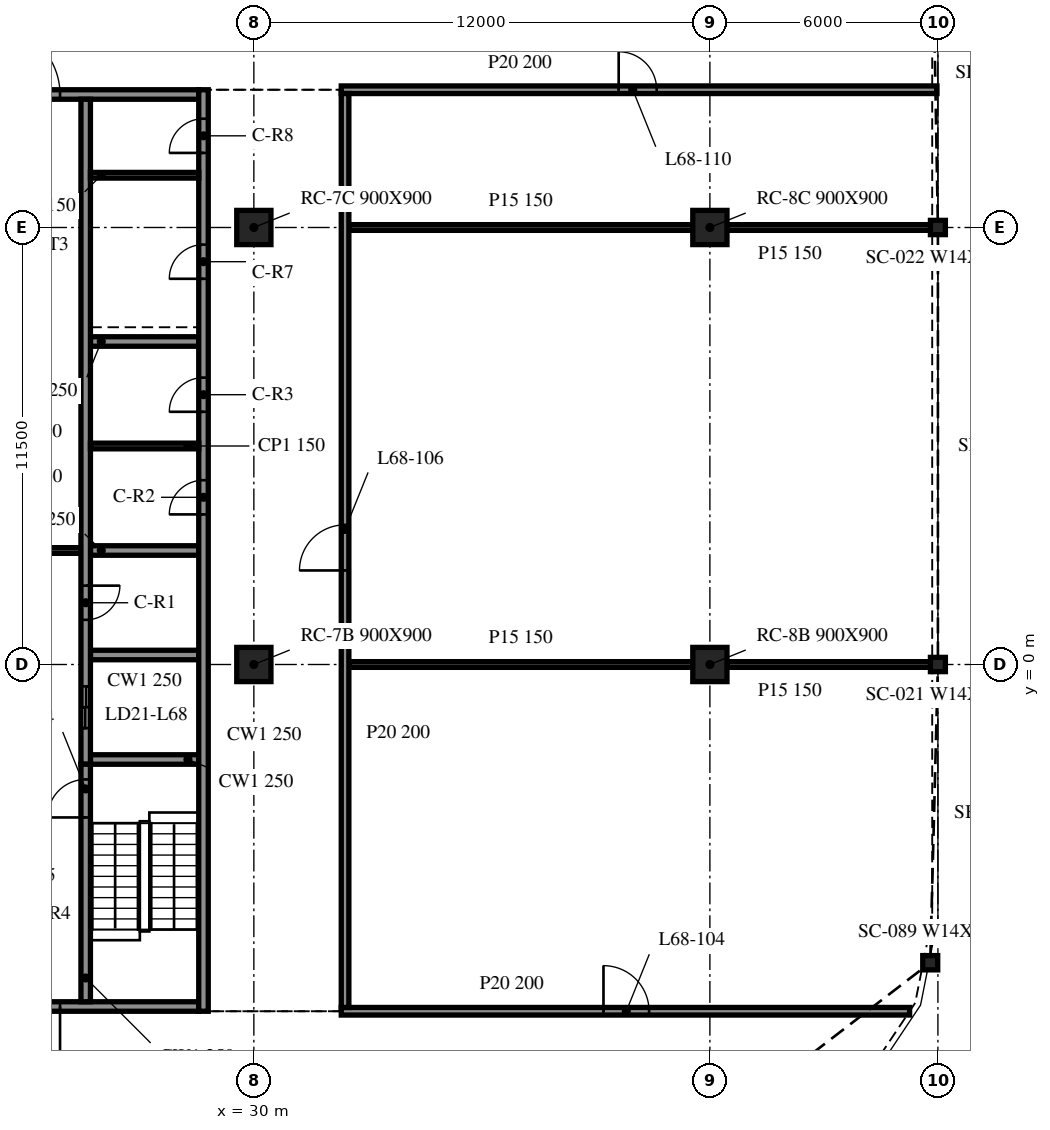
"""IFC4 building model, lengths in metres.
Left out: names, types, materials, properties, quantities, classifications, styles, units other than length and angle.
Written with IfcOpenShell. Run it as: python <this file> out.ifc"""

import sys

from ifc_helpers import new_model, si_unit, direction, frame, frame_2d, origin, origin_2d, place, context, subcontext, project, spatial, rectangle, i_section, extrude, element, fill, save


model = new_model("IFC4")
c1 = context("Model", 3, precision=1e-05, world=origin(), true_north=direction((0.0, 1.0)))
c2 = subcontext(c1, "Body", "Model", "MODEL_VIEW")
j1 = project(units=[si_unit("LENGTHUNIT", "METRE"), si_unit("PLANEANGLEUNIT", "RADIAN")], contexts=[c1])
p1 = place(None, origin())
s1 = spatial("IfcSite", under=j1, at=p1, CompositionType="ELEMENT")
p2 = place(p1, origin())
s2 = spatial("IfcBuilding", under=s1, at=p2, CompositionType="ELEMENT")
p3 = place(p2, frame((0.0, 0.0, 278.5)))
s3 = spatial("IfcBuildingStorey", under=s2, at=p3, CompositionType="ELEMENT", Elevation=278.5)
for number, where, z_axis, x_axis in (
    (1, (30.0, 0.0, -0.34), (0.0, 0.0, 1.0), (1.0, 0.0, 0.0)),
    (2, (30.0, 11.5, -0.34), (0.0, 0.0, 1.0), (1.0, 0.0, 0.0)),
    (3, (42.0, 0.0, -0.34), (0.0, 0.0, 1.0), (1.0, 0.0, 0.0)),
    (4, (42.0, 11.5, -0.34), (0.0, 0.0, 1.0), (1.0, 0.0, 0.0)),
):
    element("IfcColumn", number, at=place(p3, frame(where, z_axis=z_axis, x_axis=x_axis)), inside=s3, PredefinedType="COLUMN", context=c2, shape_type="SweptSolid", body=[
        extrude(rectangle(XDim=0.9, YDim=0.9, at=origin_2d()), origin(), (0.0, 0.0, 1.0), 3.8),
    ])
for number, where, z_axis, x_axis in (
    (5, (47.798, -7.848, -0.34), (0.0, 0.0, 1.0), (1.0, 0.0, 0.0)),
    (6, (48.0, 0.0, -0.34), (0.0, 0.0, 1.0), (1.0, 0.0, 0.0)),
    (7, (48.0, 11.5, -0.34), (0.0, 0.0, 1.0), (1.0, 0.0, 0.0)),
):
    element("IfcColumn", number, at=place(p3, frame(where, z_axis=z_axis, x_axis=x_axis)), inside=s3, PredefinedType="COLUMN", context=c2, shape_type="SweptSolid", body=[
        extrude(i_section(OverallWidth=0.394, OverallDepth=0.376, WebThickness=0.017, FlangeThickness=0.028, at=origin_2d()), origin(), (0.0, 0.0, 1.0), 3.8),
    ])
p4 = place(p3, frame((28.675, -9.125, 0.0), z_axis=(0.0, 0.0, 1.0), x_axis=(0.0, 1.0, 0.0)))
e8 = element("IfcWall", 8, at=p4, inside=s3, PredefinedType="SOLIDWALL", context=c2, shape_type="SweptSolid", body=[
    extrude(rectangle(XDim=24.25, YDim=0.25, at=frame_2d((12.125, 0.0))), origin(), (0.0, 0.0, 1.0), 3.46),
])
p5 = place(p4, frame((13.075, 0.0, 0.0)))
e9 = element("IfcOpeningElement", 9, at=p5, cuts=e8, PredefinedType="OPENING", context=c2, shape_type="SweptSolid", body=[
    extrude(rectangle(XDim=0.9, YDim=2.1, at=frame_2d((0.45, 1.05))), frame((0.0, 0.135, 0.0), z_axis=(0.0, -1.0, 0.0), x_axis=(1.0, 0.0, 0.0)), (0.0, 0.0, 1.0), 0.27),
])
p6 = place(p4, frame((15.775, 0.0, 0.0)))
e10 = element("IfcOpeningElement", 10, at=p6, cuts=e8, PredefinedType="OPENING", context=c2, shape_type="SweptSolid", body=[
    extrude(rectangle(XDim=0.9, YDim=2.1, at=frame_2d((0.45, 1.05))), frame((0.0, 0.135, 0.0), z_axis=(0.0, -1.0, 0.0), x_axis=(1.0, 0.0, 0.0)), (0.0, 0.0, 1.0), 0.27),
])
p7 = place(p4, frame((19.275, 0.0, 0.0)))
e11 = element("IfcOpeningElement", 11, at=p7, cuts=e8, PredefinedType="OPENING", context=c2, shape_type="SweptSolid", body=[
    extrude(rectangle(XDim=0.9, YDim=2.1, at=frame_2d((0.45, 1.05))), frame((0.0, 0.135, 0.0), z_axis=(0.0, -1.0, 0.0), x_axis=(1.0, 0.0, 0.0)), (0.0, 0.0, 1.0), 0.27),
])
p8 = place(p4, frame((22.587, 0.0, 0.0)))
e12 = element("IfcOpeningElement", 12, at=p8, cuts=e8, PredefinedType="OPENING", context=c2, shape_type="SweptSolid", body=[
    extrude(rectangle(XDim=0.9, YDim=2.1, at=frame_2d((0.45, 1.05))), frame((0.0, 0.135, 0.0), z_axis=(0.0, -1.0, 0.0), x_axis=(1.0, 0.0, 0.0)), (0.0, 0.0, 1.0), 0.27),
])
p9 = place(p3, frame((28.55, -9.0, 0.0), z_axis=(0.0, 0.0, 1.0), x_axis=(-1.0, 0.0, 0.0)))
e13 = element("IfcWall", 13, at=p9, inside=s3, PredefinedType="SOLIDWALL", context=c2, shape_type="SweptSolid", body=[
    extrude(rectangle(XDim=9.1, YDim=0.25, at=frame_2d((4.55, 0.0))), origin(), (0.0, 0.0, 1.0), 3.46),
])
p10 = place(p9, frame((3.65, 0.0, 0.0)))
e14 = element("IfcOpeningElement", 14, at=p10, cuts=e13, PredefinedType="OPENING", context=c2, shape_type="SweptSolid", body=[
    extrude(rectangle(XDim=1.8, YDim=2.1, at=frame_2d((0.9, 1.05))), frame((0.0, 0.135, 0.0), z_axis=(0.0, -1.0, 0.0), x_axis=(1.0, 0.0, 0.0)), (0.0, 0.0, 1.0), 0.27),
])
p11 = place(p3, frame((19.45, 15.0, 0.0), z_axis=(0.0, 0.0, 1.0), x_axis=(1.0, 0.0, 0.0)))
e15 = element("IfcWall", 15, at=p11, inside=s3, PredefinedType="SOLIDWALL", context=c2, shape_type="SweptSolid", body=[
    extrude(rectangle(XDim=9.1, YDim=0.25, at=frame_2d((4.55, 0.0))), origin(), (0.0, 0.0, 1.0), 3.46),
])
p12 = place(p11, frame((3.65, 0.0, 0.0)))
e16 = element("IfcOpeningElement", 16, at=p12, cuts=e15, PredefinedType="OPENING", context=c2, shape_type="SweptSolid", body=[
    extrude(rectangle(XDim=1.8, YDim=2.1, at=frame_2d((0.9, 1.05))), frame((0.0, 0.135, 0.0), z_axis=(0.0, -1.0, 0.0), x_axis=(1.0, 0.0, 0.0)), (0.0, 0.0, 1.0), 0.27),
])
p13 = place(p3, frame((25.575, -8.875, 0.0), z_axis=(0.0, 0.0, 1.0), x_axis=(0.0, 1.0, 0.0)))
e17 = element("IfcWall", 17, at=p13, inside=s3, PredefinedType="SOLIDWALL", context=c2, shape_type="SweptSolid", body=[
    extrude(rectangle(XDim=6.25, YDim=0.25, at=frame_2d((3.125, 0.0))), origin(), (0.0, 0.0, 1.0), 3.46),
])
p14 = place(p13, frame((4.85, 0.0, 0.0)))
e18 = element("IfcOpeningElement", 18, at=p14, cuts=e17, PredefinedType="OPENING", context=c2, shape_type="SweptSolid", body=[
    extrude(rectangle(XDim=1.0, YDim=2.1, at=frame_2d((0.5, 1.05))), frame((0.0, 0.135, 0.0), z_axis=(0.0, -1.0, 0.0), x_axis=(1.0, 0.0, 0.0)), (0.0, 0.0, 1.0), 0.27),
])
p15 = place(p3, frame((25.575, 14.875, 0.0), z_axis=(0.0, 0.0, 1.0), x_axis=(0.0, -1.0, 0.0)))
e19 = element("IfcWall", 19, at=p15, inside=s3, PredefinedType="SOLIDWALL", context=c2, shape_type="SweptSolid", body=[
    extrude(rectangle(XDim=17.5, YDim=0.25, at=frame_2d((8.75, 0.0))), origin(), (0.0, 0.0, 1.0), 3.46),
])
p16 = place(p15, frame((15.45, 0.0, 0.0)))
e20 = element("IfcOpeningElement", 20, at=p16, cuts=e19, PredefinedType="OPENING", context=c2, shape_type="SweptSolid", body=[
    extrude(rectangle(XDim=1.1, YDim=2.1, at=frame_2d((0.55, 1.05))), frame((0.0, 0.135, 0.0), z_axis=(0.0, -1.0, 0.0), x_axis=(1.0, 0.0, 0.0)), (0.0, 0.0, 1.0), 0.27),
])
p17 = place(p15, frame((12.8, 0.0, 0.0)))
e21 = element("IfcOpeningElement", 21, at=p17, cuts=e19, PredefinedType="OPENING", context=c2, shape_type="SweptSolid", body=[
    extrude(rectangle(XDim=0.9, YDim=2.1, at=frame_2d((0.45, 1.05))), frame((0.0, 0.135, 0.0), z_axis=(0.0, -1.0, 0.0), x_axis=(1.0, 0.0, 0.0)), (0.0, 0.0, 1.0), 0.27),
])
for number, where, z_axis, x_axis in (
    (22, (25.7, -2.5, 0.0), (0.0, 0.0, 1.0), (1.0, 0.0, 0.0)),
    (23, (25.7, 0.25, 0.0), (0.0, 0.0, 1.0), (1.0, 0.0, 0.0)),
    (24, (25.7, 3.0, 0.0), (0.0, 0.0, 1.0), (1.0, 0.0, 0.0)),
    (25, (25.7, 8.5, 0.0), (0.0, 0.0, 1.0), (1.0, 0.0, 0.0)),
):
    element("IfcWall", number, at=place(p3, frame(where, z_axis=z_axis, x_axis=x_axis)), inside=s3, PredefinedType="SOLIDWALL", context=c2, shape_type="SweptSolid", body=[
        extrude(rectangle(XDim=2.85, YDim=0.25, at=frame_2d((1.425, 0.0))), origin(), (0.0, 0.0, 1.0), 3.46),
    ])
p18 = place(p3, frame((22.55, 3.0, 0.0), z_axis=(0.0, 0.0, 1.0), x_axis=(1.0, 0.0, 0.0)))
e26 = element("IfcWall", 26, at=p18, inside=s3, PredefinedType="PARTITIONING", context=c2, shape_type="SweptSolid", body=[
    extrude(rectangle(XDim=2.9, YDim=0.15, at=frame_2d((1.45, 0.0))), origin(), (0.0, 0.0, 1.0), 3.46),
])
for number, where, z_axis, x_axis in (
    (27, (25.7, 5.75, 0.0), (0.0, 0.0, 1.0), (1.0, 0.0, 0.0)),
    (28, (25.7, 12.875, 0.0), (0.0, 0.0, 1.0), (1.0, 0.0, 0.0)),
):
    element("IfcWall", number, at=place(p3, frame(where, z_axis=z_axis, x_axis=x_axis)), inside=s3, PredefinedType="PARTITIONING", context=c2, shape_type="SweptSolid", body=[
        extrude(rectangle(XDim=2.85, YDim=0.15, at=frame_2d((1.425, 0.0))), origin(), (0.0, 0.0, 1.0), 3.46),
    ])
p19 = place(p3, frame((32.3, -9.125, 0.0), z_axis=(0.0, 0.0, 1.0), x_axis=(1.0, 0.0, 0.0)))
e29 = element("IfcWall", 29, at=p19, inside=s3, PredefinedType="PARTITIONING", context=c2, shape_type="SweptSolid", body=[
    extrude(rectangle(XDim=14.955, YDim=0.2, at=frame_2d((7.478, 0.0))), origin(), (0.0, 0.0, 1.0), 3.46),
])
p20 = place(p19, frame((6.9, 0.0, 0.0)))
e30 = element("IfcOpeningElement", 30, at=p20, cuts=e29, PredefinedType="OPENING", context=c2, shape_type="SweptSolid", body=[
    extrude(rectangle(XDim=1.2, YDim=2.1, at=frame_2d((0.6, 1.05))), frame((0.0, 0.11, 0.0), z_axis=(0.0, -1.0, 0.0), x_axis=(1.0, 0.0, 0.0)), (0.0, 0.0, 1.0), 0.22),
])
p21 = place(p3, frame((32.5, 0.0, 0.0), z_axis=(0.0, 0.0, 1.0), x_axis=(1.0, 0.0, 0.0)))
e31 = element("IfcWall", 31, at=p21, inside=s3, PredefinedType="PARTITIONING", context=c2, shape_type="SweptSolid", body=[
    extrude(rectangle(XDim=9.05, YDim=0.15, at=frame_2d((4.525, 0.0))), origin(), (0.0, 0.0, 1.0), 3.46),
])
p22 = place(p3, frame((42.45, 0.0, 0.0), z_axis=(0.0, 0.0, 1.0), x_axis=(1.0, 0.0, 0.0)))
e32 = element("IfcWall", 32, at=p22, inside=s3, PredefinedType="PARTITIONING", context=c2, shape_type="SweptSolid", body=[
    extrude(rectangle(XDim=5.525, YDim=0.15, at=frame_2d((2.763, 0.0))), origin(), (0.0, 0.0, 1.0), 3.46),
])
p23 = place(p3, frame((32.5, 11.5, 0.0), z_axis=(0.0, 0.0, 1.0), x_axis=(1.0, 0.0, 0.0)))
e33 = element("IfcWall", 33, at=p23, inside=s3, PredefinedType="PARTITIONING", context=c2, shape_type="SweptSolid", body=[
    extrude(rectangle(XDim=9.05, YDim=0.15, at=frame_2d((4.525, 0.0))), origin(), (0.0, 0.0, 1.0), 3.46),
])
p24 = place(p3, frame((42.45, 11.5, 0.0), z_axis=(0.0, 0.0, 1.0), x_axis=(1.0, 0.0, 0.0)))
e34 = element("IfcWall", 34, at=p24, inside=s3, PredefinedType="PARTITIONING", context=c2, shape_type="SweptSolid", body=[
    extrude(rectangle(XDim=5.525, YDim=0.15, at=frame_2d((2.763, 0.0))), origin(), (0.0, 0.0, 1.0), 3.46),
])
p25 = place(p3, frame((32.3, 15.125, 0.0), z_axis=(0.0, 0.0, 1.0), x_axis=(1.0, 0.0, 0.0)))
e35 = element("IfcWall", 35, at=p25, inside=s3, PredefinedType="PARTITIONING", context=c2, shape_type="SweptSolid", body=[
    extrude(rectangle(XDim=15.675, YDim=0.2, at=frame_2d((7.837, 0.0))), origin(), (0.0, 0.0, 1.0), 3.46),
])
p26 = place(p25, frame((7.3, 0.0, 0.0)))
e36 = element("IfcOpeningElement", 36, at=p26, cuts=e35, PredefinedType="OPENING", context=c2, shape_type="SweptSolid", body=[
    extrude(rectangle(XDim=1.0, YDim=2.1, at=frame_2d((0.5, 1.05))), frame((0.0, 0.11, 0.0), z_axis=(0.0, -1.0, 0.0), x_axis=(1.0, 0.0, 0.0)), (0.0, 0.0, 1.0), 0.22),
])
p27 = place(p3, frame((32.4, -9.025, 0.0), z_axis=(0.0, 0.0, 1.0), x_axis=(0.0, 1.0, 0.0)))
e37 = element("IfcWall", 37, at=p27, inside=s3, PredefinedType="PARTITIONING", context=c2, shape_type="SweptSolid", body=[
    extrude(rectangle(XDim=24.05, YDim=0.2, at=frame_2d((12.025, 0.0))), origin(), (0.0, 0.0, 1.0), 3.46),
])
p28 = place(p27, frame((11.5, 0.0, 0.0)))
e38 = element("IfcOpeningElement", 38, at=p28, cuts=e37, PredefinedType="OPENING", context=c2, shape_type="SweptSolid", body=[
    extrude(rectangle(XDim=1.2, YDim=2.1, at=frame_2d((0.6, 1.05))), frame((0.0, 0.11, 0.0), z_axis=(0.0, -1.0, 0.0), x_axis=(1.0, 0.0, 0.0)), (0.0, 0.0, 1.0), 0.22),
])
p29 = place(p10, origin())
e39 = element("IfcDoor", 39, at=p29, inside=s3, OperationType="DOUBLE_DOOR_SINGLE_SWING", PredefinedType="DOOR", context=c2, shape_type="SweptSolid", body=[
    extrude(rectangle(XDim=1.8, YDim=2.1, at=frame_2d((0.9, 1.05))), frame((0.0, 0.025, 0.0), z_axis=(0.0, -1.0, 0.0), x_axis=(1.0, 0.0, 0.0)), (0.0, 0.0, 1.0), 0.05),
])
fill(e14, e39)
p30 = place(p12, origin())
e40 = element("IfcDoor", 40, at=p30, inside=s3, OperationType="DOUBLE_DOOR_SINGLE_SWING", PredefinedType="DOOR", context=c2, shape_type="SweptSolid", body=[
    extrude(rectangle(XDim=1.8, YDim=2.1, at=frame_2d((0.9, 1.05))), frame((0.0, 0.025, 0.0), z_axis=(0.0, -1.0, 0.0), x_axis=(1.0, 0.0, 0.0)), (0.0, 0.0, 1.0), 0.05),
])
fill(e16, e40)
p31 = place(p16, origin())
e41 = element("IfcDoor", 41, at=p31, inside=s3, OperationType="DOUBLE_DOOR_SLIDING", PredefinedType="DOOR", context=c2, shape_type="SweptSolid", body=[
    extrude(rectangle(XDim=1.1, YDim=2.1, at=frame_2d((0.55, 1.05))), frame((0.0, 0.025, 0.0), z_axis=(0.0, -1.0, 0.0), x_axis=(1.0, 0.0, 0.0)), (0.0, 0.0, 1.0), 0.05),
])
fill(e20, e41)
p32 = place(p17, origin())
e42 = element("IfcDoor", 42, at=p32, inside=s3, OperationType="SINGLE_SWING_LEFT", PredefinedType="DOOR", context=c2, shape_type="SweptSolid", body=[
    extrude(rectangle(XDim=0.9, YDim=2.1, at=frame_2d((0.45, 1.05))), frame((0.0, 0.025, 0.0), z_axis=(0.0, -1.0, 0.0), x_axis=(1.0, 0.0, 0.0)), (0.0, 0.0, 1.0), 0.05),
])
fill(e21, e42)
p33 = place(p5, origin())
e43 = element("IfcDoor", 43, at=p33, inside=s3, OperationType="SINGLE_SWING_RIGHT", PredefinedType="DOOR", context=c2, shape_type="SweptSolid", body=[
    extrude(rectangle(XDim=0.9, YDim=2.1, at=frame_2d((0.45, 1.05))), frame((0.0, 0.025, 0.0), z_axis=(0.0, -1.0, 0.0), x_axis=(1.0, 0.0, 0.0)), (0.0, 0.0, 1.0), 0.05),
])
fill(e9, e43)
p34 = place(p6, origin())
e44 = element("IfcDoor", 44, at=p34, inside=s3, OperationType="SINGLE_SWING_LEFT", PredefinedType="DOOR", context=c2, shape_type="SweptSolid", body=[
    extrude(rectangle(XDim=0.9, YDim=2.1, at=frame_2d((0.45, 1.05))), frame((0.0, 0.025, 0.0), z_axis=(0.0, -1.0, 0.0), x_axis=(1.0, 0.0, 0.0)), (0.0, 0.0, 1.0), 0.05),
])
fill(e10, e44)
p35 = place(p7, origin())
e45 = element("IfcDoor", 45, at=p35, inside=s3, OperationType="SINGLE_SWING_LEFT", PredefinedType="DOOR", context=c2, shape_type="SweptSolid", body=[
    extrude(rectangle(XDim=0.9, YDim=2.1, at=frame_2d((0.45, 1.05))), frame((0.0, 0.025, 0.0), z_axis=(0.0, -1.0, 0.0), x_axis=(1.0, 0.0, 0.0)), (0.0, 0.0, 1.0), 0.05),
])
fill(e11, e45)
p36 = place(p8, origin())
e46 = element("IfcDoor", 46, at=p36, inside=s3, OperationType="SINGLE_SWING_RIGHT", PredefinedType="DOOR", context=c2, shape_type="SweptSolid", body=[
    extrude(rectangle(XDim=0.9, YDim=2.1, at=frame_2d((0.45, 1.05))), frame((0.0, 0.025, 0.0), z_axis=(0.0, -1.0, 0.0), x_axis=(1.0, 0.0, 0.0)), (0.0, 0.0, 1.0), 0.05),
])
fill(e12, e46)
p37 = place(p14, origin())
e47 = element("IfcDoor", 47, at=p37, inside=s3, OperationType="SINGLE_SWING_RIGHT", PredefinedType="DOOR", context=c2, shape_type="SweptSolid", body=[
    extrude(rectangle(XDim=1.0, YDim=2.1, at=frame_2d((0.5, 1.05))), frame((0.0, 0.025, 0.0), z_axis=(0.0, -1.0, 0.0), x_axis=(1.0, 0.0, 0.0)), (0.0, 0.0, 1.0), 0.05),
])
fill(e18, e47)
p38 = place(p20, origin())
e48 = element("IfcDoor", 48, at=p38, inside=s3, OperationType="SINGLE_SWING_RIGHT", PredefinedType="DOOR", context=c2, shape_type="SweptSolid", body=[
    extrude(rectangle(XDim=1.2, YDim=2.1, at=frame_2d((0.6, 1.05))), frame((0.0, 0.025, 0.0), z_axis=(0.0, -1.0, 0.0), x_axis=(1.0, 0.0, 0.0)), (0.0, 0.0, 1.0), 0.05),
])
fill(e30, e48)
p39 = place(p28, origin())
e49 = element("IfcDoor", 49, at=p39, inside=s3, OperationType="SINGLE_SWING_LEFT", PredefinedType="DOOR", context=c2, shape_type="SweptSolid", body=[
    extrude(rectangle(XDim=1.2, YDim=2.1, at=frame_2d((0.6, 1.05))), frame((0.0, 0.025, 0.0), z_axis=(0.0, -1.0, 0.0), x_axis=(1.0, 0.0, 0.0)), (0.0, 0.0, 1.0), 0.05),
])
fill(e38, e49)
p40 = place(p26, origin())
e50 = element("IfcDoor", 50, at=p40, inside=s3, OperationType="SINGLE_SWING_LEFT", PredefinedType="DOOR", context=c2, shape_type="SweptSolid", body=[
    extrude(rectangle(XDim=1.0, YDim=2.1, at=frame_2d((0.5, 1.05))), frame((0.0, 0.025, 0.0), z_axis=(0.0, -1.0, 0.0), x_axis=(1.0, 0.0, 0.0)), (0.0, 0.0, 1.0), 0.05),
])
fill(e36, e50)
save(model, sys.argv[1])
